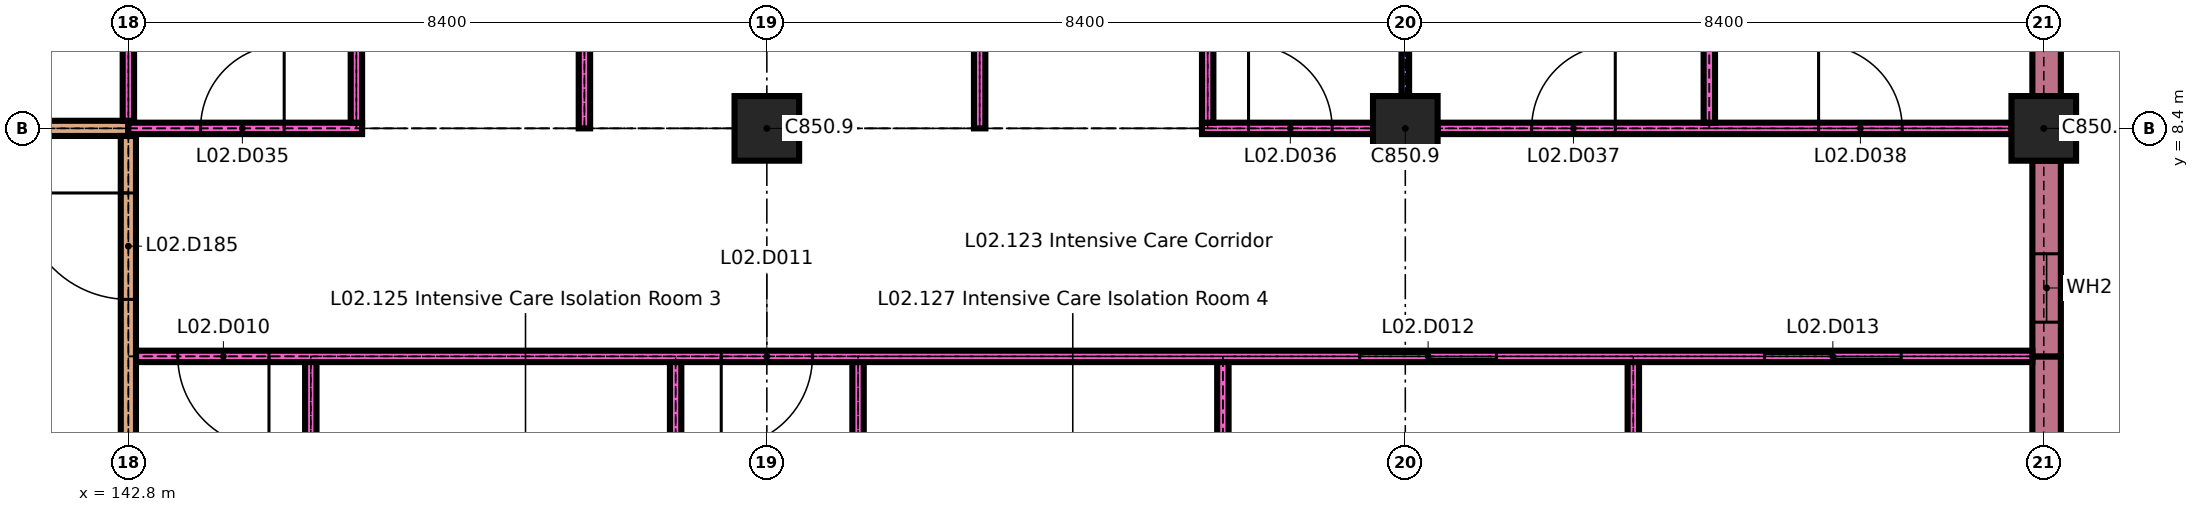
"""IFC4 building model, lengths in metres.
Left out: names, types, materials, properties, quantities, classifications, styles, units other than length and angle.
Written with IfcOpenShell. Run it as: python <this file> out.ifc"""

import sys

from ifc_helpers import new_model, si_unit, direction, frame, frame_2d, origin, origin_2d, place, context, subcontext, project, spatial, rectangle, extrude, element, fill, save


model = new_model("IFC4")
c1 = context("Model", 3, precision=1e-05, world=origin(), true_north=direction((0.0, 1.0)))
c2 = subcontext(c1, "Body", "Model", "MODEL_VIEW")
j1 = project(units=[si_unit("LENGTHUNIT", "METRE"), si_unit("PLANEANGLEUNIT", "RADIAN")], contexts=[c1])
p1 = place(None, origin())
s1 = spatial("IfcSite", under=j1, at=p1, CompositionType="ELEMENT")
p2 = place(p1, origin())
s2 = spatial("IfcBuilding", under=s1, at=p2, CompositionType="ELEMENT")
p3 = place(p2, frame((0.0, 0.0, 8.4)))
s3 = spatial("IfcBuildingStorey", under=s2, at=p3, CompositionType="ELEMENT", Elevation=8.4)
for number, where, z_axis, x_axis in (
    (1, (151.2, 8.4, 0.0), (0.0, 0.0, 1.0), (1.0, 0.0, 0.0)),
    (2, (159.6, 8.4, 0.0), (0.0, 0.0, 1.0), (1.0, 0.0, 0.0)),
    (3, (168.0, 8.4, 0.0), (0.0, 0.0, 1.0), (1.0, 0.0, 0.0)),
):
    element("IfcColumn", number, at=place(p3, frame(where, z_axis=z_axis, x_axis=x_axis)), inside=s3, PredefinedType="COLUMN", context=c2, shape_type="SweptSolid", body=[
        extrude(rectangle(XDim=0.85, YDim=0.85, at=origin_2d()), origin(), (0.0, 0.0, 1.0), 4.2),
    ])
p4 = place(p3, frame((168.038, 0.425, 0.0), z_axis=(0.0, 0.0, 1.0), x_axis=(0.0, 1.0, 0.0)))
e4 = element("IfcWall", 4, at=p4, inside=s3, PredefinedType="SOLIDWALL", context=c2, shape_type="SweptSolid", body=[
    extrude(rectangle(XDim=4.975, YDim=0.375, at=frame_2d((2.487, 0.0))), origin(), (0.0, 0.0, 1.0), 3.9),
])
p5 = place(p4, frame((0.625, 0.0, 0.9)))
e5 = element("IfcOpeningElement", 5, at=p5, cuts=e4, PredefinedType="OPENING", context=c2, shape_type="SweptSolid", body=[
    extrude(rectangle(XDim=2.1, YDim=2.1, at=frame_2d((1.05, 1.05))), frame((0.0, 0.198, 0.0), z_axis=(0.0, -1.0, 0.0), x_axis=(1.0, 0.0, 0.0)), (0.0, 0.0, 1.0), 0.395),
])
p6 = place(p3, frame((168.038, 5.4, 0.0), z_axis=(0.0, 0.0, 1.0), x_axis=(0.0, 1.0, 0.0)))
e6 = element("IfcWall", 6, at=p6, inside=s3, PredefinedType="SOLIDWALL", context=c2, shape_type="SweptSolid", body=[
    extrude(rectangle(XDim=2.575, YDim=0.375, at=frame_2d((1.288, 0.0))), origin(), (0.0, 0.0, 1.0), 3.9),
])
p7 = place(p6, frame((0.45, 0.0, 0.9)))
e7 = element("IfcOpeningElement", 7, at=p7, cuts=e6, PredefinedType="OPENING", context=c2, shape_type="SweptSolid", body=[
    extrude(rectangle(XDim=0.9, YDim=2.1, at=frame_2d((0.45, 1.05))), frame((0.0, 0.198, 0.0), z_axis=(0.0, -1.0, 0.0), x_axis=(1.0, 0.0, 0.0)), (0.0, 0.0, 1.0), 0.395),
])
p8 = place(p3, frame((168.038, 8.825, 0.0), z_axis=(0.0, 0.0, 1.0), x_axis=(0.0, 1.0, 0.0)))
e8 = element("IfcWall", 8, at=p8, inside=s3, PredefinedType="SOLIDWALL", context=c2, shape_type="SweptSolid", body=[
    extrude(rectangle(XDim=4.975, YDim=0.375, at=frame_2d((2.488, 0.0))), origin(), (0.0, 0.0, 1.0), 3.9),
])
p9 = place(p8, frame((0.625, 0.0, 0.9)))
e9 = element("IfcOpeningElement", 9, at=p9, cuts=e8, PredefinedType="OPENING", context=c2, shape_type="SweptSolid", body=[
    extrude(rectangle(XDim=2.1, YDim=2.1, at=frame_2d((1.05, 1.05))), frame((0.0, 0.198, 0.0), z_axis=(0.0, -1.0, 0.0), x_axis=(1.0, 0.0, 0.0)), (0.0, 0.0, 1.0), 0.395),
])
p10 = place(p3, frame((142.9, 5.4, 0.0), z_axis=(0.0, 0.0, 1.0), x_axis=(1.0, 0.0, 0.0)))
e10 = element("IfcWall", 10, at=p10, inside=s3, PredefinedType="PARTITIONING", context=c2, shape_type="SweptSolid", body=[
    extrude(rectangle(XDim=24.95, YDim=0.15, at=frame_2d((12.475, 0.0))), origin(), (0.0, 0.0, 1.0), 4.2),
])
p11 = place(p10, frame((0.55, 0.0, 0.0)))
e11 = element("IfcOpeningElement", 11, at=p11, cuts=e10, PredefinedType="OPENING", context=c2, shape_type="SweptSolid", body=[
    extrude(rectangle(XDim=1.2, YDim=2.1, at=frame_2d((0.6, 1.05))), frame((0.0, 0.085, 0.0), z_axis=(0.0, -1.0, 0.0), x_axis=(1.0, 0.0, 0.0)), (0.0, 0.0, 1.0), 0.17),
])
p12 = place(p10, frame((7.7, 0.0, 0.0)))
e12 = element("IfcOpeningElement", 12, at=p12, cuts=e10, PredefinedType="OPENING", context=c2, shape_type="SweptSolid", body=[
    extrude(rectangle(XDim=1.2, YDim=2.1, at=frame_2d((0.6, 1.05))), frame((0.0, 0.085, 0.0), z_axis=(0.0, -1.0, 0.0), x_axis=(1.0, 0.0, 0.0)), (0.0, 0.0, 1.0), 0.17),
])
p13 = place(p10, frame((16.1, 0.0, 0.0)))
e13 = element("IfcOpeningElement", 13, at=p13, cuts=e10, PredefinedType="OPENING", context=c2, shape_type="SweptSolid", body=[
    extrude(rectangle(XDim=1.8, YDim=2.4, at=frame_2d((0.9, 1.2))), frame((0.0, 0.085, 0.0), z_axis=(0.0, -1.0, 0.0), x_axis=(1.0, 0.0, 0.0)), (0.0, 0.0, 1.0), 0.17),
])
p14 = place(p10, frame((21.425, 0.0, 0.0)))
e14 = element("IfcOpeningElement", 14, at=p14, cuts=e10, PredefinedType="OPENING", context=c2, shape_type="SweptSolid", body=[
    extrude(rectangle(XDim=1.8, YDim=2.4, at=frame_2d((0.9, 1.2))), frame((0.0, 0.085, 0.0), z_axis=(0.0, -1.0, 0.0), x_axis=(1.0, 0.0, 0.0)), (0.0, 0.0, 1.0), 0.17),
])
p15 = place(p3, frame((134.4, 8.4, 0.0), z_axis=(0.0, 0.0, 1.0), x_axis=(1.0, 0.0, 0.0)))
e15 = element("IfcWall", 15, at=p15, inside=s3, PredefinedType="PARTITIONING", context=c2, shape_type="SweptSolid", body=[
    extrude(rectangle(XDim=8.4, YDim=0.2, at=frame_2d((4.2, 0.0))), origin(), (0.0, 0.0, 1.0), 4.2),
])
p16 = place(p15, frame((3.5, 0.0, 0.0)))
e16 = element("IfcOpeningElement", 16, at=p16, cuts=e15, PredefinedType="OPENING", context=c2, shape_type="SweptSolid", body=[
    extrude(rectangle(XDim=1.4, YDim=2.1, at=frame_2d((0.7, 1.05))), frame((0.0, 0.11, 0.0), z_axis=(0.0, -1.0, 0.0), x_axis=(1.0, 0.0, 0.0)), (0.0, 0.0, 1.0), 0.22),
])
p17 = place(p3, frame((142.8, 8.4, 0.0), z_axis=(0.0, 0.0, 1.0), x_axis=(1.0, 0.0, 0.0)))
e17 = element("IfcWall", 17, at=p17, inside=s3, PredefinedType="PARTITIONING", context=c2, shape_type="SweptSolid", body=[
    extrude(rectangle(XDim=3.075, YDim=0.15, at=frame_2d((1.538, 0.0))), origin(), (0.0, 0.0, 1.0), 4.2),
])
p18 = place(p17, frame((0.95, 0.0, 0.0)))
e18 = element("IfcOpeningElement", 18, at=p18, cuts=e17, PredefinedType="OPENING", context=c2, shape_type="SweptSolid", body=[
    extrude(rectangle(XDim=1.1, YDim=2.1, at=frame_2d((0.55, 1.05))), frame((0.0, 0.085, 0.0), z_axis=(0.0, -1.0, 0.0), x_axis=(1.0, 0.0, 0.0)), (0.0, 0.0, 1.0), 0.17),
])
p19 = place(p3, frame((156.925, 8.4, 0.0), z_axis=(0.0, 0.0, 1.0), x_axis=(1.0, 0.0, 0.0)))
e19 = element("IfcWall", 19, at=p19, inside=s3, PredefinedType="PARTITIONING", context=c2, shape_type="SweptSolid", body=[
    extrude(rectangle(XDim=2.25, YDim=0.15, at=frame_2d((1.125, 0.0))), origin(), (0.0, 0.0, 1.0), 4.2),
])
p20 = place(p19, frame((0.613, 0.0, 0.0)))
e20 = element("IfcOpeningElement", 20, at=p20, cuts=e19, PredefinedType="OPENING", context=c2, shape_type="SweptSolid", body=[
    extrude(rectangle(XDim=1.1, YDim=2.1, at=frame_2d((0.55, 1.05))), frame((0.0, 0.085, 0.0), z_axis=(0.0, -1.0, 0.0), x_axis=(1.0, 0.0, 0.0)), (0.0, 0.0, 1.0), 0.17),
])
p21 = place(p3, frame((160.025, 8.4, 0.0), z_axis=(0.0, 0.0, 1.0), x_axis=(1.0, 0.0, 0.0)))
e21 = element("IfcWall", 21, at=p21, inside=s3, PredefinedType="PARTITIONING", context=c2, shape_type="SweptSolid", body=[
    extrude(rectangle(XDim=7.55, YDim=0.15, at=frame_2d((3.775, 0.0))), origin(), (0.0, 0.0, 1.0), 4.2),
])
p22 = place(p21, frame((1.238, 0.0, 0.0)))
e22 = element("IfcOpeningElement", 22, at=p22, cuts=e21, PredefinedType="OPENING", context=c2, shape_type="SweptSolid", body=[
    extrude(rectangle(XDim=1.1, YDim=2.1, at=frame_2d((0.55, 1.05))), frame((0.0, 0.085, 0.0), z_axis=(0.0, -1.0, 0.0), x_axis=(1.0, 0.0, 0.0)), (0.0, 0.0, 1.0), 0.17),
])
p23 = place(p21, frame((5.012, 0.0, 0.0)))
e23 = element("IfcOpeningElement", 23, at=p23, cuts=e21, PredefinedType="OPENING", context=c2, shape_type="SweptSolid", body=[
    extrude(rectangle(XDim=1.1, YDim=2.1, at=frame_2d((0.55, 1.05))), frame((0.0, 0.085, 0.0), z_axis=(0.0, -1.0, 0.0), x_axis=(1.0, 0.0, 0.0)), (0.0, 0.0, 1.0), 0.17),
])
p24 = place(p3, frame((142.8, 3.6, 0.0), z_axis=(0.0, 0.0, 1.0), x_axis=(0.0, 1.0, 0.0)))
e24 = element("IfcWall", 24, at=p24, inside=s3, PredefinedType="PARTITIONING", context=c2, shape_type="SweptSolid", body=[
    extrude(rectangle(XDim=4.7, YDim=0.2, at=frame_2d((2.35, 0.0))), origin(), (0.0, 0.0, 1.0), 4.2),
])
p25 = place(p24, frame((2.55, 0.0, 0.0)))
e25 = element("IfcOpeningElement", 25, at=p25, cuts=e24, PredefinedType="OPENING", context=c2, shape_type="SweptSolid", body=[
    extrude(rectangle(XDim=1.4, YDim=2.1, at=frame_2d((0.7, 1.05))), frame((0.0, 0.11, 0.0), z_axis=(0.0, -1.0, 0.0), x_axis=(1.0, 0.0, 0.0)), (0.0, 0.0, 1.0), 0.22),
])
p26 = place(p3, frame((142.8, 8.5, 0.0), z_axis=(0.0, 0.0, 1.0), x_axis=(0.0, 1.0, 0.0)))
e26 = element("IfcWall", 26, at=p26, inside=s3, PredefinedType="PARTITIONING", context=c2, shape_type="SweptSolid", body=[
    extrude(rectangle(XDim=5.225, YDim=0.15, at=frame_2d((2.613, 0.0))), origin(), (0.0, 0.0, 1.0), 4.2),
])
p27 = place(p3, frame((145.2, 0.15, 0.0), z_axis=(0.0, 0.0, 1.0), x_axis=(0.0, 1.0, 0.0)))
e27 = element("IfcWall", 27, at=p27, inside=s3, PredefinedType="PARTITIONING", context=c2, shape_type="SweptSolid", body=[
    extrude(rectangle(XDim=5.175, YDim=0.15, at=frame_2d((2.587, 0.0))), origin(), (0.0, 0.0, 1.0), 4.2),
])
p28 = place(p27, frame((1.688, 0.0, 0.0)))
e28 = element("IfcOpeningElement", 28, at=p28, cuts=e27, PredefinedType="OPENING", context=c2, shape_type="SweptSolid", body=[
    extrude(rectangle(XDim=1.8, YDim=2.4, at=frame_2d((0.9, 1.2))), frame((0.0, 0.085, 0.0), z_axis=(0.0, -1.0, 0.0), x_axis=(1.0, 0.0, 0.0)), (0.0, 0.0, 1.0), 0.17),
])
p29 = place(p3, frame((145.8, 8.475, 0.0), z_axis=(0.0, 0.0, 1.0), x_axis=(0.0, 1.0, 0.0)))
e29 = element("IfcWall", 29, at=p29, inside=s3, PredefinedType="PARTITIONING", context=c2, shape_type="SweptSolid", body=[
    extrude(rectangle(XDim=5.25, YDim=0.15, at=frame_2d((2.625, 0.0))), origin(), (0.0, 0.0, 1.0), 4.2),
])
p30 = place(p3, frame((148.8, 8.4, 0.0), z_axis=(0.0, 0.0, 1.0), x_axis=(0.0, 1.0, 0.0)))
e30 = element("IfcWall", 30, at=p30, inside=s3, PredefinedType="PARTITIONING", context=c2, shape_type="SweptSolid", body=[
    extrude(rectangle(XDim=5.325, YDim=0.15, at=frame_2d((2.663, 0.0))), origin(), (0.0, 0.0, 1.0), 4.2),
])
p31 = place(p3, frame((150.0, 0.15, 0.0), z_axis=(0.0, 0.0, 1.0), x_axis=(0.0, 1.0, 0.0)))
e31 = element("IfcWall", 31, at=p31, inside=s3, PredefinedType="PARTITIONING", context=c2, shape_type="SweptSolid", body=[
    extrude(rectangle(XDim=5.175, YDim=0.15, at=frame_2d((2.587, 0.0))), origin(), (0.0, 0.0, 1.0), 4.2),
])
p32 = place(p3, frame((152.4, 0.15, 0.0), z_axis=(0.0, 0.0, 1.0), x_axis=(0.0, 1.0, 0.0)))
e32 = element("IfcWall", 32, at=p32, inside=s3, PredefinedType="PARTITIONING", context=c2, shape_type="SweptSolid", body=[
    extrude(rectangle(XDim=5.175, YDim=0.15, at=frame_2d((2.587, 0.0))), origin(), (0.0, 0.0, 1.0), 4.2),
])
p33 = place(p32, frame((1.688, 0.0, 0.0)))
e33 = element("IfcOpeningElement", 33, at=p33, cuts=e32, PredefinedType="OPENING", context=c2, shape_type="SweptSolid", body=[
    extrude(rectangle(XDim=1.8, YDim=2.4, at=frame_2d((0.9, 1.2))), frame((0.0, 0.085, 0.0), z_axis=(0.0, -1.0, 0.0), x_axis=(1.0, 0.0, 0.0)), (0.0, 0.0, 1.0), 0.17),
])
p34 = place(p3, frame((154.0, 8.4, 0.0), z_axis=(0.0, 0.0, 1.0), x_axis=(0.0, 1.0, 0.0)))
e34 = element("IfcWall", 34, at=p34, inside=s3, PredefinedType="PARTITIONING", context=c2, shape_type="SweptSolid", body=[
    extrude(rectangle(XDim=5.325, YDim=0.15, at=frame_2d((2.663, 0.0))), origin(), (0.0, 0.0, 1.0), 4.2),
])
p35 = place(p3, frame((157.0, 8.475, 0.0), z_axis=(0.0, 0.0, 1.0), x_axis=(0.0, 1.0, 0.0)))
e35 = element("IfcWall", 35, at=p35, inside=s3, PredefinedType="PARTITIONING", context=c2, shape_type="SweptSolid", body=[
    extrude(rectangle(XDim=5.25, YDim=0.15, at=frame_2d((2.625, 0.0))), origin(), (0.0, 0.0, 1.0), 4.2),
])
p36 = place(p3, frame((157.2, 0.15, 0.0), z_axis=(0.0, 0.0, 1.0), x_axis=(0.0, 1.0, 0.0)))
e36 = element("IfcWall", 36, at=p36, inside=s3, PredefinedType="PARTITIONING", context=c2, shape_type="SweptSolid", body=[
    extrude(rectangle(XDim=5.175, YDim=0.15, at=frame_2d((2.587, 0.0))), origin(), (0.0, 0.0, 1.0), 4.2),
])
p37 = place(p3, frame((159.6, 8.825, 0.0), z_axis=(0.0, 0.0, 1.0), x_axis=(0.0, 1.0, 0.0)))
e37 = element("IfcWall", 37, at=p37, inside=s3, PredefinedType="PARTITIONING", context=c2, shape_type="SweptSolid", body=[
    extrude(rectangle(XDim=4.9, YDim=0.1, at=frame_2d((2.45, 0.0))), origin(), (0.0, 0.0, 1.0), 4.2),
])
p38 = place(p3, frame((162.6, 0.15, 0.0), z_axis=(0.0, 0.0, 1.0), x_axis=(0.0, 1.0, 0.0)))
e38 = element("IfcWall", 38, at=p38, inside=s3, PredefinedType="PARTITIONING", context=c2, shape_type="SweptSolid", body=[
    extrude(rectangle(XDim=5.175, YDim=0.15, at=frame_2d((2.587, 0.0))), origin(), (0.0, 0.0, 1.0), 4.2),
])
p39 = place(p3, frame((163.6, 8.475, 0.0), z_axis=(0.0, 0.0, 1.0), x_axis=(0.0, 1.0, 0.0)))
e39 = element("IfcWall", 39, at=p39, inside=s3, PredefinedType="PARTITIONING", context=c2, shape_type="SweptSolid", body=[
    extrude(rectangle(XDim=5.25, YDim=0.15, at=frame_2d((2.625, 0.0))), origin(), (0.0, 0.0, 1.0), 4.2),
])
p40 = place(p7, origin())
e40 = element("IfcWindow", 40, at=p40, inside=s3, PartitioningType="SINGLE_PANEL", PredefinedType="WINDOW", context=c2, shape_type="SweptSolid", body=[
    extrude(rectangle(XDim=0.9, YDim=2.1, at=frame_2d((0.45, 1.05))), frame((0.0, 0.03, 0.0), z_axis=(0.0, -1.0, 0.0), x_axis=(1.0, 0.0, 0.0)), (0.0, 0.0, 1.0), 0.06),
])
fill(e7, e40)
p41 = place(p11, origin())
e41 = element("IfcDoor", 41, at=p41, inside=s3, OperationType="SINGLE_SWING_RIGHT", PredefinedType="DOOR", context=c2, shape_type="SweptSolid", body=[
    extrude(rectangle(XDim=1.2, YDim=2.1, at=frame_2d((0.6, 1.05))), frame((0.0, 0.05, 0.0), z_axis=(0.0, -1.0, 0.0), x_axis=(1.0, 0.0, 0.0)), (0.0, 0.0, 1.0), 0.1),
])
fill(e11, e41)
p42 = place(p12, origin())
e42 = element("IfcDoor", 42, at=p42, inside=s3, OperationType="SINGLE_SWING_LEFT", PredefinedType="DOOR", context=c2, shape_type="SweptSolid", body=[
    extrude(rectangle(XDim=1.2, YDim=2.1, at=frame_2d((0.6, 1.05))), frame((0.0, 0.05, 0.0), z_axis=(0.0, -1.0, 0.0), x_axis=(1.0, 0.0, 0.0)), (0.0, 0.0, 1.0), 0.1),
])
fill(e12, e42)
p43 = place(p13, origin())
e43 = element("IfcDoor", 43, at=p43, inside=s3, OperationType="DOUBLE_DOOR_SLIDING", PredefinedType="DOOR", context=c2, shape_type="SweptSolid", body=[
    extrude(rectangle(XDim=1.8, YDim=2.4, at=frame_2d((0.9, 1.2))), frame((0.0, 0.035, 0.0), z_axis=(0.0, -1.0, 0.0), x_axis=(1.0, 0.0, 0.0)), (0.0, 0.0, 1.0), 0.07),
])
fill(e13, e43)
p44 = place(p14, origin())
e44 = element("IfcDoor", 44, at=p44, inside=s3, OperationType="DOUBLE_DOOR_SLIDING", PredefinedType="DOOR", context=c2, shape_type="SweptSolid", body=[
    extrude(rectangle(XDim=1.8, YDim=2.4, at=frame_2d((0.9, 1.2))), frame((0.0, 0.035, 0.0), z_axis=(0.0, -1.0, 0.0), x_axis=(1.0, 0.0, 0.0)), (0.0, 0.0, 1.0), 0.07),
])
fill(e14, e44)
p45 = place(p18, origin())
e45 = element("IfcDoor", 45, at=p45, inside=s3, OperationType="SINGLE_SWING_LEFT", PredefinedType="DOOR", context=c2, shape_type="SweptSolid", body=[
    extrude(rectangle(XDim=1.1, YDim=2.1, at=frame_2d((0.55, 1.05))), frame((0.0, 0.025, 0.0), z_axis=(0.0, -1.0, 0.0), x_axis=(1.0, 0.0, 0.0)), (0.0, 0.0, 1.0), 0.05),
])
fill(e18, e45)
p46 = place(p20, origin())
e46 = element("IfcDoor", 46, at=p46, inside=s3, OperationType="SINGLE_SWING_RIGHT", PredefinedType="DOOR", context=c2, shape_type="SweptSolid", body=[
    extrude(rectangle(XDim=1.1, YDim=2.1, at=frame_2d((0.55, 1.05))), frame((0.0, 0.025, 0.0), z_axis=(0.0, -1.0, 0.0), x_axis=(1.0, 0.0, 0.0)), (0.0, 0.0, 1.0), 0.05),
])
fill(e20, e46)
p47 = place(p22, origin())
e47 = element("IfcDoor", 47, at=p47, inside=s3, OperationType="SINGLE_SWING_LEFT", PredefinedType="DOOR", context=c2, shape_type="SweptSolid", body=[
    extrude(rectangle(XDim=1.1, YDim=2.1, at=frame_2d((0.55, 1.05))), frame((0.0, 0.025, 0.0), z_axis=(0.0, -1.0, 0.0), x_axis=(1.0, 0.0, 0.0)), (0.0, 0.0, 1.0), 0.05),
])
fill(e22, e47)
p48 = place(p23, origin())
e48 = element("IfcDoor", 48, at=p48, inside=s3, OperationType="SINGLE_SWING_RIGHT", PredefinedType="DOOR", context=c2, shape_type="SweptSolid", body=[
    extrude(rectangle(XDim=1.1, YDim=2.1, at=frame_2d((0.55, 1.05))), frame((0.0, 0.025, 0.0), z_axis=(0.0, -1.0, 0.0), x_axis=(1.0, 0.0, 0.0)), (0.0, 0.0, 1.0), 0.05),
])
fill(e23, e48)
p49 = place(p25, origin())
e49 = element("IfcDoor", 49, at=p49, inside=s3, OperationType="SINGLE_SWING_LEFT", PredefinedType="DOOR", context=c2, shape_type="SweptSolid", body=[
    extrude(rectangle(XDim=1.4, YDim=2.1, at=frame_2d((0.7, 1.05))), frame((0.0, 0.03, 0.0), z_axis=(0.0, -1.0, 0.0), x_axis=(1.0, 0.0, 0.0)), (0.0, 0.0, 1.0), 0.06),
])
fill(e25, e49)
save(model, sys.argv[1])
